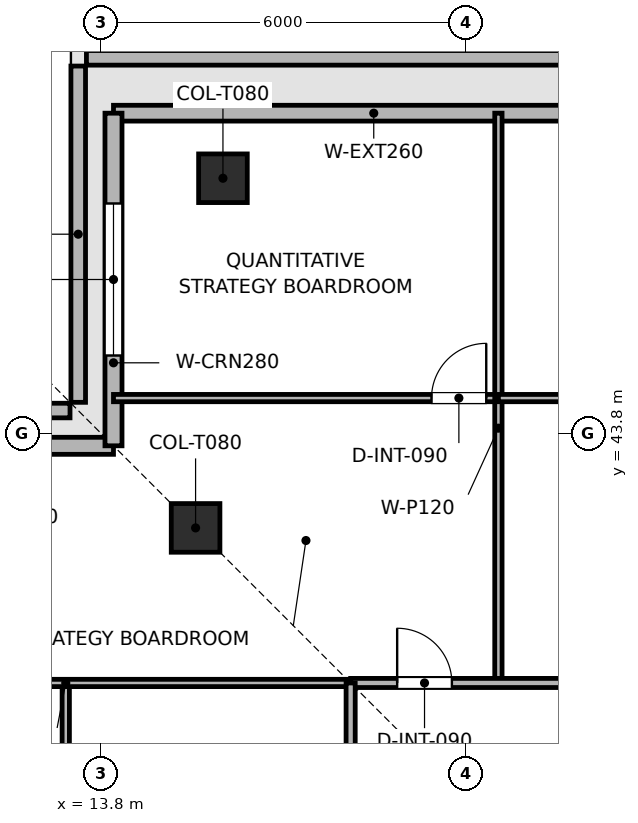
"""IFC4 building model, lengths in metres.
Left out: names, types, materials, properties, quantities, classifications, styles, units other than length and angle.
Written with IfcOpenShell. Run it as: python <this file> out.ifc"""

import sys

from ifc_helpers import new_model, si_unit, direction, frame, frame_2d, origin, origin_2d, place, context, subcontext, project, spatial, rectangle, extrude, element, fill, save


model = new_model("IFC4")
c1 = context("Model", 3, precision=1e-05, world=origin(), true_north=direction((0.0, 1.0)))
c2 = subcontext(c1, "Body", "Model", "MODEL_VIEW")
j1 = project(units=[si_unit("LENGTHUNIT", "METRE"), si_unit("PLANEANGLEUNIT", "RADIAN")], contexts=[c1])
p1 = place(None, origin())
s1 = spatial("IfcSite", under=j1, at=p1, CompositionType="ELEMENT")
p2 = place(p1, origin())
s2 = spatial("IfcBuilding", under=s1, at=p2, CompositionType="ELEMENT")
p3 = place(p2, frame((0.0, 0.0, 355.5)))
s3 = spatial("IfcBuildingStorey", under=s2, at=p3, CompositionType="ELEMENT", Elevation=355.5)
for number, where, z_axis, x_axis in (
    (1, (15.8, 48.0, 0.003), (0.0, 0.0, 1.0), (1.0, 0.0, 0.0)),
    (2, (15.35, 42.25, 0.003), (0.0, 0.0, 1.0), (1.0, 0.0, 0.0)),
):
    element("IfcColumn", number, at=place(p3, frame(where, z_axis=z_axis, x_axis=x_axis)), inside=s3, PredefinedType="COLUMN", context=c2, shape_type="SweptSolid", body=[
        extrude(rectangle(XDim=0.8, YDim=0.8, at=origin_2d()), origin(), (0.0, 0.0, 1.0), 4.234),
    ])
p4 = place(p3, frame((44.045, 49.98, 0.0), z_axis=(0.0, 0.0, 1.0), x_axis=(-1.0, 0.0, 0.0)))
e3 = element("IfcWall", 3, at=p4, inside=s3, PredefinedType="PARAPET", context=c2, shape_type="SweptSolid", body=[
    extrude(rectangle(XDim=30.49, YDim=0.24, at=frame_2d((15.245, 0.0))), origin(), (0.0, 0.0, 1.0), 1.2),
])
for number, where, z_axis, x_axis in (
    (4, (13.42, 49.845, 0.0), (0.0, 0.0, 1.0), (0.0, -1.0, 0.0)),
    (5, (13.285, 44.18, 0.0), (0.0, 0.0, 1.0), (-1.0, 0.0, 0.0)),
):
    element("IfcWall", number, at=place(p3, frame(where, z_axis=z_axis, x_axis=x_axis)), inside=s3, PredefinedType="PARAPET", context=c2, shape_type="SweptSolid", body=[
        extrude(rectangle(XDim=5.53, YDim=0.24, at=frame_2d((2.765, 0.0))), origin(), (0.0, 0.0, 1.0), 1.2),
    ])
p5 = place(p3, frame((14.0, 49.07, 0.0), z_axis=(0.0, 0.0, 1.0), x_axis=(1.0, 0.0, 0.0)))
e6 = element("IfcWall", 6, at=p5, inside=s3, PredefinedType="SOLIDWALL", context=c2, shape_type="SweptSolid", body=[
    extrude(rectangle(XDim=10.0, YDim=0.26, at=frame_2d((5.0, 0.0))), origin(), (0.0, 0.0, 1.0), 4.24),
])
p6 = place(p5, frame((8.55, 0.0, 0.9)))
e7 = element("IfcOpeningElement", 7, at=p6, cuts=e6, PredefinedType="OPENING", context=c2, shape_type="SweptSolid", body=[
    extrude(rectangle(XDim=1.2, YDim=2.1, at=frame_2d((0.6, 1.05))), frame((0.0, 0.14, 0.0), z_axis=(0.0, -1.0, 0.0), x_axis=(1.0, 0.0, 0.0)), (0.0, 0.0, 1.0), 0.28),
])
p7 = place(p3, frame((8.53, 43.6, 0.0), z_axis=(0.0, 0.0, 1.0), x_axis=(1.0, 0.0, 0.0)))
e8 = element("IfcWall", 8, at=p7, inside=s3, PredefinedType="SOLIDWALL", context=c2, shape_type="SweptSolid", body=[
    extrude(rectangle(XDim=5.47, YDim=0.28, at=frame_2d((2.735, 0.0))), origin(), (0.0, 0.0, 1.0), 4.24),
])
p8 = place(p7, frame((1.485, 0.0, 0.9)))
e9 = element("IfcOpeningElement", 9, at=p8, cuts=e8, PredefinedType="OPENING", context=c2, shape_type="SweptSolid", body=[
    extrude(rectangle(XDim=2.5, YDim=1.9, at=frame_2d((1.25, 0.95))), frame((0.0, 0.15, 0.0), z_axis=(0.0, -1.0, 0.0), x_axis=(1.0, 0.0, 0.0)), (0.0, 0.0, 1.0), 0.3),
])
p9 = place(p3, frame((14.0, 43.6, 0.0), z_axis=(0.0, 0.0, 1.0), x_axis=(0.0, 1.0, 0.0)))
e10 = element("IfcWall", 10, at=p9, inside=s3, PredefinedType="SOLIDWALL", context=c2, shape_type="SweptSolid", body=[
    extrude(rectangle(XDim=5.47, YDim=0.28, at=frame_2d((2.735, 0.0))), origin(), (0.0, 0.0, 1.0), 4.24),
])
p10 = place(p9, frame((1.485, 0.0, 0.9)))
e11 = element("IfcOpeningElement", 11, at=p10, cuts=e10, PredefinedType="OPENING", context=c2, shape_type="SweptSolid", body=[
    extrude(rectangle(XDim=2.5, YDim=1.9, at=frame_2d((1.25, 0.95))), frame((0.0, 0.15, 0.0), z_axis=(0.0, -1.0, 0.0), x_axis=(1.0, 0.0, 0.0)), (0.0, 0.0, 1.0), 0.3),
])
p11 = place(p3, frame((14.0, 44.385, 0.0), z_axis=(0.0, 0.0, 1.0), x_axis=(1.0, 0.0, 0.0)))
e12 = element("IfcWall", 12, at=p11, inside=s3, PredefinedType="PARTITIONING", context=c2, shape_type="SweptSolid", body=[
    extrude(rectangle(XDim=6.33, YDim=0.12, at=frame_2d((3.165, 0.0))), origin(), (0.0, 0.0, 1.0), 3.825),
])
p12 = place(p11, frame((5.23, 0.0, 0.0)))
e13 = element("IfcOpeningElement", 13, at=p12, cuts=e12, PredefinedType="OPENING", context=c2, shape_type="SweptSolid", body=[
    extrude(rectangle(XDim=0.9, YDim=2.1, at=frame_2d((0.45, 1.05))), frame((0.0, 0.07, 0.0), z_axis=(0.0, -1.0, 0.0), x_axis=(1.0, 0.0, 0.0)), (0.0, 0.0, 1.0), 0.14),
])
p13 = place(p3, frame((20.33, 39.7, 0.0), z_axis=(0.0, 0.0, 1.0), x_axis=(0.0, 1.0, 0.0)))
e14 = element("IfcWall", 14, at=p13, inside=s3, PredefinedType="PARTITIONING", context=c2, shape_type="SweptSolid", body=[
    extrude(rectangle(XDim=9.37, YDim=0.12, at=frame_2d((4.685, 0.0))), origin(), (0.0, 0.0, 1.0), 3.825),
])
p14 = place(p3, frame((20.33, 44.385, 0.0), z_axis=(0.0, 0.0, 1.0), x_axis=(1.0, 0.0, 0.0)))
e15 = element("IfcWall", 15, at=p14, inside=s3, PredefinedType="PARTITIONING", context=c2, shape_type="SweptSolid", body=[
    extrude(rectangle(XDim=8.431, YDim=0.12, at=frame_2d((4.215, 0.0))), origin(), (0.0, 0.0, 1.0), 3.825),
])
p15 = place(p14, frame((1.686, 0.0, 0.0)))
e16 = element("IfcOpeningElement", 16, at=p15, cuts=e15, PredefinedType="OPENING", context=c2, shape_type="SweptSolid", body=[
    extrude(rectangle(XDim=0.9, YDim=2.1, at=frame_2d((0.45, 1.05))), frame((0.0, 0.07, 0.0), z_axis=(0.0, -1.0, 0.0), x_axis=(1.0, 0.0, 0.0)), (0.0, 0.0, 1.0), 0.14),
])
p16 = place(p3, frame((13.215, 14.0, 0.0), z_axis=(0.0, 0.0, 1.0), x_axis=(0.0, 1.0, 0.0)))
e17 = element("IfcWall", 17, at=p16, inside=s3, PredefinedType="PARTITIONING", context=c2, shape_type="SweptSolid", body=[
    extrude(rectangle(XDim=25.7, YDim=0.12, at=frame_2d((12.85, 0.0))), origin(), (0.0, 0.0, 1.0), 3.825),
])
p17 = place(p16, frame((20.533, 0.0, 0.0)))
e18 = element("IfcOpeningElement", 18, at=p17, cuts=e17, PredefinedType="OPENING", context=c2, shape_type="SweptSolid", body=[
    extrude(rectangle(XDim=0.9, YDim=2.1, at=frame_2d((0.45, 1.05))), frame((0.0, 0.07, 0.0), z_axis=(0.0, -1.0, 0.0), x_axis=(1.0, 0.0, 0.0)), (0.0, 0.0, 1.0), 0.14),
])
p18 = place(p3, frame((8.53, 39.7, 0.0), z_axis=(0.0, 0.0, 1.0), x_axis=(1.0, 0.0, 0.0)))
e19 = element("IfcWall", 19, at=p18, inside=s3, PredefinedType="PARTITIONING", context=c2, shape_type="SweptSolid", body=[
    extrude(rectangle(XDim=9.37, YDim=0.12, at=frame_2d((4.685, 0.0))), origin(), (0.0, 0.0, 1.0), 3.825),
])
p19 = place(p3, frame((17.9, 39.7, 0.0), z_axis=(0.0, 0.0, 1.0), x_axis=(1.0, 0.0, 0.0)))
e20 = element("IfcWall", 20, at=p19, inside=s3, PredefinedType="PARTITIONING", context=c2, shape_type="SweptSolid", body=[
    extrude(rectangle(XDim=21.8, YDim=0.15, at=frame_2d((10.9, 0.0))), origin(), (0.0, 0.0, 1.0), 3.825),
])
p20 = place(p19, frame((0.765, 0.0, 0.0)))
e21 = element("IfcOpeningElement", 21, at=p20, cuts=e20, PredefinedType="OPENING", context=c2, shape_type="SweptSolid", body=[
    extrude(rectangle(XDim=0.9, YDim=2.1, at=frame_2d((0.45, 1.05))), frame((0.0, 0.085, 0.0), z_axis=(0.0, -1.0, 0.0), x_axis=(1.0, 0.0, 0.0)), (0.0, 0.0, 1.0), 0.17),
])
p21 = place(p19, frame((6.195, 0.0, 0.0)))
e22 = element("IfcOpeningElement", 22, at=p21, cuts=e20, PredefinedType="OPENING", context=c2, shape_type="SweptSolid", body=[
    extrude(rectangle(XDim=0.9, YDim=2.1, at=frame_2d((0.45, 1.05))), frame((0.0, 0.085, 0.0), z_axis=(0.0, -1.0, 0.0), x_axis=(1.0, 0.0, 0.0)), (0.0, 0.0, 1.0), 0.17),
])
p22 = place(p19, frame((15.88, 0.0, 0.0)))
e23 = element("IfcOpeningElement", 23, at=p22, cuts=e20, PredefinedType="OPENING", context=c2, shape_type="SweptSolid", body=[
    extrude(rectangle(XDim=0.9, YDim=2.1, at=frame_2d((0.45, 1.05))), frame((0.0, 0.085, 0.0), z_axis=(0.0, -1.0, 0.0), x_axis=(1.0, 0.0, 0.0)), (0.0, 0.0, 1.0), 0.17),
])
p23 = place(p3, frame((17.9, 14.0, 0.0), z_axis=(0.0, 0.0, 1.0), x_axis=(0.0, 1.0, 0.0)))
e24 = element("IfcWall", 24, at=p23, inside=s3, PredefinedType="PARTITIONING", context=c2, shape_type="SweptSolid", body=[
    extrude(rectangle(XDim=25.7, YDim=0.15, at=frame_2d((12.85, 0.0))), origin(), (0.0, 0.0, 1.0), 3.825),
])
p24 = place(p23, frame((12.4, 0.0, 0.0)))
e25 = element("IfcOpeningElement", 25, at=p24, cuts=e24, PredefinedType="OPENING", context=c2, shape_type="SweptSolid", body=[
    extrude(rectangle(XDim=0.9, YDim=2.1, at=frame_2d((0.45, 1.05))), frame((0.0, 0.085, 0.0), z_axis=(0.0, -1.0, 0.0), x_axis=(1.0, 0.0, 0.0)), (0.0, 0.0, 1.0), 0.17),
])
p25 = place(p10, origin())
e26 = element("IfcWindow", 26, at=p25, inside=s3, PartitioningType="SINGLE_PANEL", PredefinedType="WINDOW", context=c2, shape_type="SweptSolid", body=[
    extrude(rectangle(XDim=2.5, YDim=1.9, at=frame_2d((1.25, 0.95))), frame((0.0, 0.03, 0.0), z_axis=(0.0, -1.0, 0.0), x_axis=(1.0, 0.0, 0.0)), (0.0, 0.0, 1.0), 0.06),
])
fill(e11, e26)
p26 = place(p12, origin())
e27 = element("IfcDoor", 27, at=p26, inside=s3, OperationType="SINGLE_SWING_RIGHT", PredefinedType="DOOR", context=c2, shape_type="SweptSolid", body=[
    extrude(rectangle(XDim=0.9, YDim=2.1, at=frame_2d((0.45, 1.05))), frame((0.0, 0.025, 0.0), z_axis=(0.0, -1.0, 0.0), x_axis=(1.0, 0.0, 0.0)), (0.0, 0.0, 1.0), 0.05),
])
fill(e13, e27)
p27 = place(p20, origin())
e28 = element("IfcDoor", 28, at=p27, inside=s3, OperationType="SINGLE_SWING_LEFT", PredefinedType="DOOR", context=c2, shape_type="SweptSolid", body=[
    extrude(rectangle(XDim=0.9, YDim=2.1, at=frame_2d((0.45, 1.05))), frame((0.0, 0.025, 0.0), z_axis=(0.0, -1.0, 0.0), x_axis=(1.0, 0.0, 0.0)), (0.0, 0.0, 1.0), 0.05),
])
fill(e21, e28)
save(model, sys.argv[1])
